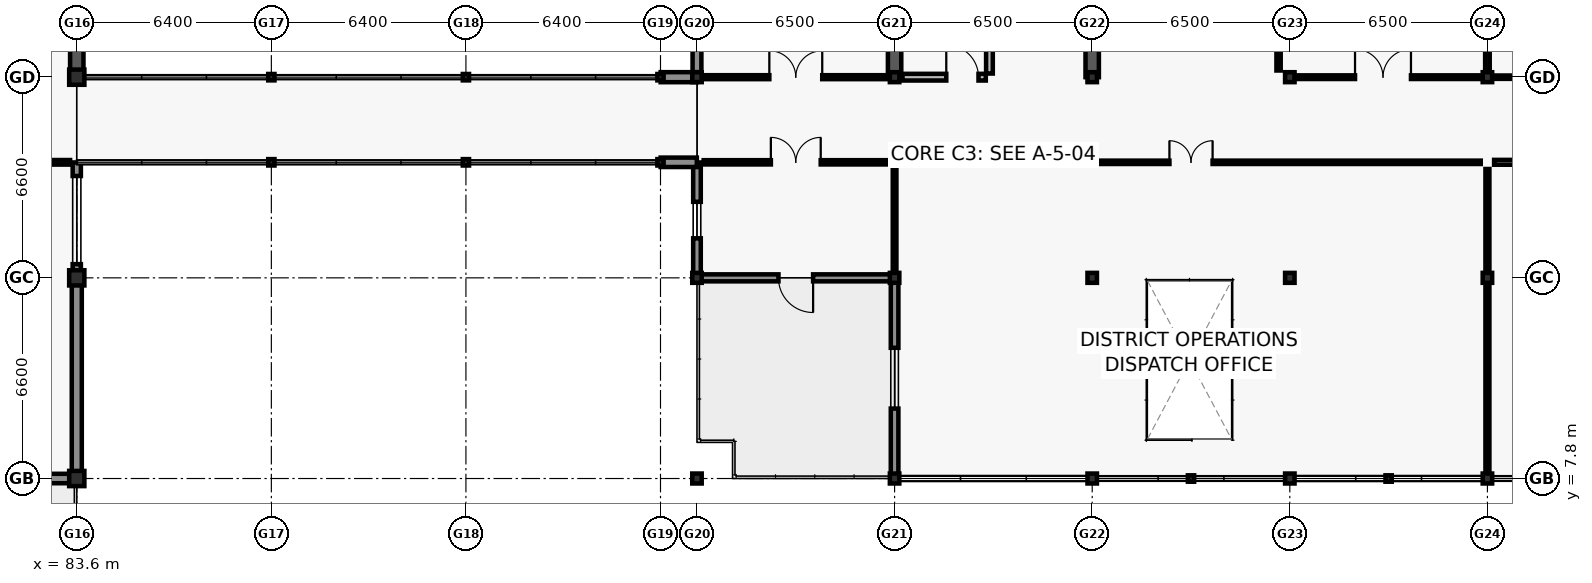
"""IFC4 building model, lengths in metres.
Left out: names, types, materials, properties, quantities, classifications, styles, units other than length and angle.
Written with IfcOpenShell. Run it as: python <this file> out.ifc"""

import sys

from ifc_helpers import new_model, si_unit, direction, frame, frame_2d, origin, origin_2d, place, context, subcontext, project, spatial, rectangle, i_section, extrude, element, fill, save


model = new_model("IFC4")
c1 = context("Model", 3, precision=1e-05, world=origin(), true_north=direction((0.0, 1.0)))
c2 = subcontext(c1, "Body", "Model", "MODEL_VIEW")
j1 = project(units=[si_unit("LENGTHUNIT", "METRE"), si_unit("PLANEANGLEUNIT", "RADIAN")], contexts=[c1])
p1 = place(None, origin())
s1 = spatial("IfcSite", under=j1, at=p1, CompositionType="ELEMENT")
p2 = place(p1, origin())
s2 = spatial("IfcBuilding", under=s1, at=p2, CompositionType="ELEMENT")
p3 = place(p2, frame((0.0, 0.0, 5.4)))
s3 = spatial("IfcBuildingStorey", under=s2, at=p3, CompositionType="ELEMENT", Elevation=5.4)
for number, where, z_axis, x_axis in (
    (1, (83.6, 7.8, 0.0), (0.0, 0.0, 1.0), (1.0, 0.0, 0.0)),
    (2, (83.6, 14.4, 0.0), (0.0, 0.0, 1.0), (1.0, 0.0, 0.0)),
    (3, (83.6, 21.0, 0.0), (0.0, 0.0, 1.0), (1.0, 0.0, 0.0)),
):
    element("IfcColumn", number, at=place(p3, frame(where, z_axis=z_axis, x_axis=x_axis)), inside=s3, PredefinedType="COLUMN", context=c2, shape_type="SweptSolid", body=[
        extrude(i_section(OverallWidth=0.5, OverallDepth=0.5, WebThickness=0.02, FlangeThickness=0.036, at=origin_2d()), origin(), (0.0, 0.0, 1.0), 4.2),
    ])
for number, where, z_axis, x_axis in (
    (4, (90.0, 18.2, 0.0), (0.0, 0.0, 1.0), (1.0, 0.0, 0.0)),
    (5, (90.0, 21.0, 0.0), (0.0, 0.0, 1.0), (1.0, 0.0, 0.0)),
    (6, (96.4, 18.2, 0.0), (0.0, 0.0, 1.0), (1.0, 0.0, 0.0)),
    (7, (96.4, 21.0, 0.0), (0.0, 0.0, 1.0), (1.0, 0.0, 0.0)),
    (8, (102.8, 18.2, 0.0), (0.0, 0.0, 1.0), (1.0, 0.0, 0.0)),
    (9, (102.8, 21.0, 0.0), (0.0, 0.0, 1.0), (1.0, 0.0, 0.0)),
):
    element("IfcColumn", number, at=place(p3, frame(where, z_axis=z_axis, x_axis=x_axis)), inside=s3, PredefinedType="COLUMN", context=c2, shape_type="SweptSolid", body=[
        extrude(i_section(OverallWidth=0.205, OverallDepth=0.21, WebThickness=0.009, FlangeThickness=0.014, FilletRadius=0.011, at=origin_2d()), origin(), (0.0, 0.0, 1.0), 4.2),
    ])
for number, where, z_axis, x_axis in (
    (10, (104.0, 7.8, 0.0), (0.0, 0.0, 1.0), (1.0, 0.0, 0.0)),
    (11, (104.0, 14.4, 0.0), (0.0, 0.0, 1.0), (1.0, 0.0, 0.0)),
    (12, (104.0, 21.0, 0.0), (0.0, 0.0, 1.0), (1.0, 0.0, 0.0)),
    (13, (110.5, 7.8, 0.0), (0.0, 0.0, 1.0), (1.0, 0.0, 0.0)),
    (14, (110.5, 14.4, 0.0), (0.0, 0.0, 1.0), (1.0, 0.0, 0.0)),
    (15, (110.5, 21.0, 0.0), (0.0, 0.0, 1.0), (1.0, 0.0, 0.0)),
    (16, (117.0, 7.8, 0.0), (0.0, 0.0, 1.0), (1.0, 0.0, 0.0)),
    (17, (117.0, 14.4, 0.0), (0.0, 0.0, 1.0), (1.0, 0.0, 0.0)),
    (18, (117.0, 21.0, 0.0), (0.0, 0.0, 1.0), (1.0, 0.0, 0.0)),
    (19, (123.5, 7.8, 0.0), (0.0, 0.0, 1.0), (1.0, 0.0, 0.0)),
    (20, (123.5, 14.4, 0.0), (0.0, 0.0, 1.0), (1.0, 0.0, 0.0)),
    (21, (123.5, 21.0, 0.0), (0.0, 0.0, 1.0), (1.0, 0.0, 0.0)),
    (22, (130.0, 7.8, 0.0), (0.0, 0.0, 1.0), (1.0, 0.0, 0.0)),
    (23, (130.0, 14.4, 0.0), (0.0, 0.0, 1.0), (1.0, 0.0, 0.0)),
    (24, (130.0, 21.0, 0.0), (0.0, 0.0, 1.0), (1.0, 0.0, 0.0)),
):
    element("IfcColumn", number, at=place(p3, frame(where, z_axis=z_axis, x_axis=x_axis)), inside=s3, PredefinedType="COLUMN", context=c2, shape_type="SweptSolid", body=[
        extrude(i_section(OverallWidth=0.311, OverallDepth=0.327, WebThickness=0.016, FlangeThickness=0.025, FilletRadius=0.017, at=origin_2d()), origin(), (0.0, 0.0, 1.0), 4.2),
    ])
for number, where, z_axis, x_axis in (
    (25, (120.25, 7.8, 0.0), (0.0, 0.0, 1.0), (1.0, 0.0, 0.0)),
    (26, (126.75, 7.8, 0.0), (0.0, 0.0, 1.0), (1.0, 0.0, 0.0)),
):
    element("IfcColumn", number, at=place(p3, frame(where, z_axis=z_axis, x_axis=x_axis)), inside=s3, PredefinedType="PILASTER", context=c2, shape_type="SweptSolid", body=[
        extrude(i_section(OverallWidth=0.205, OverallDepth=0.21, WebThickness=0.009, FlangeThickness=0.014, FilletRadius=0.011, at=origin_2d()), origin(), (0.0, 0.0, 1.0), 4.2),
    ])
for number, where, z_axis, x_axis in (
    (27, (83.6, 21.0, 0.0), (0.0, 0.0, 1.0), (0.0, 1.0, 0.0)),
    (28, (110.5, 21.0, 0.0), (0.0, 0.0, 1.0), (0.0, 1.0, 0.0)),
    (29, (117.0, 21.0, 0.0), (0.0, 0.0, 1.0), (0.0, 1.0, 0.0)),
):
    element("IfcWall", number, at=place(p3, frame(where, z_axis=z_axis, x_axis=x_axis)), inside=s3, PredefinedType="SHEAR", context=c2, shape_type="SweptSolid", body=[
        extrude(rectangle(XDim=6.38, YDim=0.44, at=frame_2d((3.19, 0.0))), origin(), (0.0, 0.0, 1.0), 3.96),
    ])
p4 = place(p3, frame((83.595, 7.8, 0.0), z_axis=(0.0, 0.0, 1.0), x_axis=(-1.0, 0.0, 0.0)))
e30 = element("IfcWall", 30, at=p4, inside=s3, PredefinedType="SOLIDWALL", context=c2, shape_type="SweptSolid", body=[
    extrude(rectangle(XDim=6.39, YDim=0.31, at=frame_2d((3.195, 0.0))), origin(), (0.0, 0.0, 1.0), 3.32),
])
p5 = place(p4, frame((2.385, 0.0, 0.0)))
e31 = element("IfcOpeningElement", 31, at=p5, cuts=e30, PredefinedType="OPENING", context=c2, shape_type="SweptSolid", body=[
    extrude(rectangle(XDim=1.62, YDim=2.18, at=frame_2d((0.81, 1.09))), frame((0.0, 0.165, 0.0), z_axis=(0.0, -1.0, 0.0), x_axis=(1.0, 0.0, 0.0)), (0.0, 0.0, 1.0), 0.33),
])
p6 = place(p3, frame((83.6, 14.395, 0.0), z_axis=(0.0, 0.0, 1.0), x_axis=(0.0, -1.0, 0.0)))
e32 = element("IfcWall", 32, at=p6, inside=s3, PredefinedType="SOLIDWALL", context=c2, shape_type="SweptSolid", body=[
    extrude(rectangle(XDim=6.59, YDim=0.33, at=frame_2d((3.295, 0.0))), origin(), (0.0, 0.0, 1.0), 3.32),
])
p7 = place(p3, frame((83.6, 18.195, 0.0), z_axis=(0.0, 0.0, 1.0), x_axis=(0.0, -1.0, 0.0)))
e33 = element("IfcWall", 33, at=p7, inside=s3, PredefinedType="SOLIDWALL", context=c2, shape_type="SweptSolid", body=[
    extrude(rectangle(XDim=3.79, YDim=0.27, at=frame_2d((1.895, 0.0))), origin(), (0.0, 0.0, 1.0), 3.32),
])
p8 = place(p7, frame((0.445, 0.0, 0.72)))
e34 = element("IfcOpeningElement", 34, at=p8, cuts=e33, PredefinedType="OPENING", context=c2, shape_type="SweptSolid", body=[
    extrude(rectangle(XDim=2.9, YDim=1.15, at=frame_2d((1.45, 0.575))), frame((0.0, 0.145, 0.0), z_axis=(0.0, -1.0, 0.0), x_axis=(1.0, 0.0, 0.0)), (0.0, 0.0, 1.0), 0.29),
])
p9 = place(p3, frame((110.495, 14.4, 0.0), z_axis=(0.0, 0.0, 1.0), x_axis=(-1.0, 0.0, 0.0)))
e35 = element("IfcWall", 35, at=p9, inside=s3, PredefinedType="SOLIDWALL", context=c2, shape_type="SweptSolid", body=[
    extrude(rectangle(XDim=6.49, YDim=0.23, at=frame_2d((3.245, 0.0))), origin(), (0.0, 0.0, 1.0), 3.32),
])
p10 = place(p9, frame((2.675, 0.0, 0.0)))
e36 = element("IfcOpeningElement", 36, at=p10, cuts=e35, PredefinedType="OPENING", context=c2, shape_type="SweptSolid", body=[
    extrude(rectangle(XDim=1.14, YDim=2.14, at=frame_2d((0.57, 1.07))), frame((0.0, 0.125, 0.0), z_axis=(0.0, -1.0, 0.0), x_axis=(1.0, 0.0, 0.0)), (0.0, 0.0, 1.0), 0.25),
])
p11 = place(p3, frame((110.5, 7.805, 0.0), z_axis=(0.0, 0.0, 1.0), x_axis=(0.0, 1.0, 0.0)))
e37 = element("IfcWall", 37, at=p11, inside=s3, PredefinedType="SOLIDWALL", context=c2, shape_type="SweptSolid", body=[
    extrude(rectangle(XDim=6.59, YDim=0.25, at=frame_2d((3.295, 0.0))), origin(), (0.0, 0.0, 1.0), 3.32),
])
p12 = place(p11, frame((2.295, 0.0, 0.8)))
e38 = element("IfcOpeningElement", 38, at=p12, cuts=e37, PredefinedType="OPENING", context=c2, shape_type="SweptSolid", body=[
    extrude(rectangle(XDim=2.0, YDim=1.55, at=frame_2d((1.0, 0.775))), frame((0.0, 0.135, 0.0), z_axis=(0.0, -1.0, 0.0), x_axis=(1.0, 0.0, 0.0)), (0.0, 0.0, 1.0), 0.27),
])
p13 = place(p3, frame((104.0, 14.405, 0.0), z_axis=(0.0, 0.0, 1.0), x_axis=(0.0, 1.0, 0.0)))
e39 = element("IfcWall", 39, at=p13, inside=s3, PredefinedType="SOLIDWALL", context=c2, shape_type="SweptSolid", body=[
    extrude(rectangle(XDim=3.79, YDim=0.25, at=frame_2d((1.895, 0.0))), origin(), (0.0, 0.0, 1.0), 3.32),
])
p14 = place(p13, frame((1.295, 0.0, 0.8)))
e40 = element("IfcOpeningElement", 40, at=p14, cuts=e39, PredefinedType="OPENING", context=c2, shape_type="SweptSolid", body=[
    extrude(rectangle(XDim=1.2, YDim=2.05, at=frame_2d((0.6, 1.025))), frame((0.0, 0.135, 0.0), z_axis=(0.0, -1.0, 0.0), x_axis=(1.0, 0.0, 0.0)), (0.0, 0.0, 1.0), 0.27),
])
p15 = place(p3, frame((104.0, 21.005, 0.0), z_axis=(0.0, 0.0, 1.0), x_axis=(0.0, 1.0, 0.0)))
e41 = element("IfcWall", 41, at=p15, inside=s3, PredefinedType="SOLIDWALL", context=c2, shape_type="SweptSolid", body=[
    extrude(rectangle(XDim=6.59, YDim=0.29, at=frame_2d((3.295, 0.0))), origin(), (0.0, 0.0, 1.0), 3.32),
])
p16 = place(p15, frame((2.545, 0.0, 0.8)))
e42 = element("IfcOpeningElement", 42, at=p16, cuts=e41, PredefinedType="OPENING", context=c2, shape_type="SweptSolid", body=[
    extrude(rectangle(XDim=1.5, YDim=2.05, at=frame_2d((0.75, 1.025))), frame((0.0, 0.155, 0.0), z_axis=(0.0, -1.0, 0.0), x_axis=(1.0, 0.0, 0.0)), (0.0, 0.0, 1.0), 0.31),
])
p17 = place(p3, frame((103.995, 18.2, 0.0), z_axis=(0.0, 0.0, 1.0), x_axis=(-1.0, 0.0, 0.0)))
e43 = element("IfcWall", 43, at=p17, inside=s3, PredefinedType="SOLIDWALL", context=c2, shape_type="SweptSolid", body=[
    extrude(rectangle(XDim=1.19, YDim=0.31, at=frame_2d((0.595, 0.0))), origin(), (0.0, 0.0, 1.0), 3.32),
])
p18 = place(p3, frame((102.805, 21.0, 0.0), z_axis=(0.0, 0.0, 1.0), x_axis=(1.0, 0.0, 0.0)))
e44 = element("IfcWall", 44, at=p18, inside=s3, PredefinedType="SOLIDWALL", context=c2, shape_type="SweptSolid", body=[
    extrude(rectangle(XDim=1.19, YDim=0.33, at=frame_2d((0.595, 0.0))), origin(), (0.0, 0.0, 1.0), 3.32),
])
p19 = place(p3, frame((113.62, 21.12, 0.0), z_axis=(0.0, 0.0, 1.0), x_axis=(0.0, 1.0, 0.0)))
e45 = element("IfcWall", 45, at=p19, inside=s3, PredefinedType="SOLIDWALL", context=c2, shape_type="SweptSolid", body=[
    extrude(rectangle(XDim=6.255, YDim=0.22, at=frame_2d((3.127, 0.0))), origin(), (0.0, 0.0, 1.0), 3.96),
])
p20 = place(p3, frame((110.76, 21.0, 0.0), z_axis=(0.0, 0.0, 1.0), x_axis=(1.0, 0.0, 0.0)))
e46 = element("IfcWall", 46, at=p20, inside=s3, PredefinedType="SOLIDWALL", context=c2, shape_type="SweptSolid", body=[
    extrude(rectangle(XDim=2.74, YDim=0.22, at=frame_2d((1.37, 0.0))), origin(), (0.0, 0.0, 1.0), 3.32),
])
p21 = place(p20, frame((1.44, 0.0, 0.0)))
e47 = element("IfcOpeningElement", 47, at=p21, cuts=e46, PredefinedType="OPENING", context=c2, shape_type="SweptSolid", body=[
    extrude(rectangle(XDim=1.06, YDim=2.1, at=frame_2d((0.53, 1.05))), frame((0.0, 0.12, 0.0), z_axis=(0.0, -1.0, 0.0), x_axis=(1.0, 0.0, 0.0)), (0.0, 0.0, 1.0), 0.24),
])
p22 = place(p3, frame((123.13, 21.22, 0.0), z_axis=(0.0, 0.0, 1.0), x_axis=(0.0, 1.0, 0.0)))
e48 = element("IfcWall", 48, at=p22, inside=s3, PredefinedType="PARTITIONING", context=c2, shape_type="SweptSolid", body=[
    extrude(rectangle(XDim=2.76, YDim=0.14, at=frame_2d((1.38, 0.0))), origin(), (0.0, 0.0, 1.0), 3.3),
])
p23 = place(p22, frame((0.88, 0.0, 0.0)))
e49 = element("IfcOpeningElement", 49, at=p23, cuts=e48, PredefinedType="OPENING", context=c2, shape_type="SweptSolid", body=[
    extrude(rectangle(XDim=1.0, YDim=2.12, at=frame_2d((0.5, 1.06))), frame((0.0, 0.08, 0.0), z_axis=(0.0, -1.0, 0.0), x_axis=(1.0, 0.0, 0.0)), (0.0, 0.0, 1.0), 0.16),
])
p24 = place(p3, frame((77.42, 18.2, 0.0), z_axis=(0.0, 0.0, 1.0), x_axis=(1.0, 0.0, 0.0)))
e50 = element("IfcWall", 50, at=p24, inside=s3, PredefinedType="PARTITIONING", context=c2, shape_type="SweptSolid", body=[
    extrude(rectangle(XDim=5.96, YDim=0.15, at=frame_2d((2.98, 0.0))), origin(), (0.0, 0.0, 1.0), 3.3),
])
p25 = place(p24, frame((2.325, 0.0, 0.0)))
e51 = element("IfcOpeningElement", 51, at=p25, cuts=e50, PredefinedType="OPENING", context=c2, shape_type="SweptSolid", body=[
    extrude(rectangle(XDim=1.31, YDim=2.14, at=frame_2d((0.655, 1.07))), frame((0.0, 0.085, 0.0), z_axis=(0.0, -1.0, 0.0), x_axis=(1.0, 0.0, 0.0)), (0.0, 0.0, 1.0), 0.17),
])
p26 = place(p3, frame((130.0, 8.02, 0.0), z_axis=(0.0, 0.0, 1.0), x_axis=(0.0, 1.0, 0.0)))
e52 = element("IfcWall", 52, at=p26, inside=s3, PredefinedType="PARTITIONING", context=c2, shape_type="SweptSolid", body=[
    extrude(rectangle(XDim=9.96, YDim=0.13, at=frame_2d((4.98, 0.0))), origin(), (0.0, 0.0, 1.0), 3.3),
])
p27 = place(p3, frame((110.5, 14.62, 0.0), z_axis=(0.0, 0.0, 1.0), x_axis=(0.0, 1.0, 0.0)))
e53 = element("IfcWall", 53, at=p27, inside=s3, PredefinedType="PARTITIONING", context=c2, shape_type="SweptSolid", body=[
    extrude(rectangle(XDim=3.36, YDim=0.12, at=frame_2d((1.68, 0.0))), origin(), (0.0, 0.0, 1.0), 3.3),
])
p28 = place(p3, frame((110.72, 18.2, 0.0), z_axis=(0.0, 0.0, 1.0), x_axis=(1.0, 0.0, 0.0)))
e54 = element("IfcWall", 54, at=p28, inside=s3, PredefinedType="PARTITIONING", context=c2, shape_type="SweptSolid", body=[
    extrude(rectangle(XDim=19.06, YDim=0.11, at=frame_2d((9.53, 0.0))), origin(), (0.0, 0.0, 1.0), 3.3),
])
p29 = place(p28, frame((8.82, 0.0, 0.0)))
e55 = element("IfcOpeningElement", 55, at=p29, cuts=e54, PredefinedType="OPENING", context=c2, shape_type="SweptSolid", body=[
    extrude(rectangle(XDim=1.42, YDim=2.15, at=frame_2d((0.71, 1.075))), frame((0.0, 0.065, 0.0), z_axis=(0.0, -1.0, 0.0), x_axis=(1.0, 0.0, 0.0)), (0.0, 0.0, 1.0), 0.13),
])
p30 = place(p3, frame((130.22, 18.2, 0.0), z_axis=(0.0, 0.0, 1.0), x_axis=(1.0, 0.0, 0.0)))
e56 = element("IfcWall", 56, at=p30, inside=s3, PredefinedType="PARTITIONING", context=c2, shape_type="SweptSolid", body=[
    extrude(rectangle(XDim=19.06, YDim=0.16, at=frame_2d((9.53, 0.0))), origin(), (0.0, 0.0, 1.0), 3.3),
])
p31 = place(p30, frame((8.79, 0.0, 0.0)))
e57 = element("IfcOpeningElement", 57, at=p31, cuts=e56, PredefinedType="OPENING", context=c2, shape_type="SweptSolid", body=[
    extrude(rectangle(XDim=1.48, YDim=2.18, at=frame_2d((0.74, 1.09))), frame((0.0, 0.09, 0.0), z_axis=(0.0, -1.0, 0.0), x_axis=(1.0, 0.0, 0.0)), (0.0, 0.0, 1.0), 0.18),
])
p32 = place(p3, frame((104.22, 18.2, 0.0), z_axis=(0.0, 0.0, 1.0), x_axis=(1.0, 0.0, 0.0)))
e58 = element("IfcWall", 58, at=p32, inside=s3, PredefinedType="PARTITIONING", context=c2, shape_type="SweptSolid", body=[
    extrude(rectangle(XDim=6.06, YDim=0.14, at=frame_2d((3.03, 0.0))), origin(), (0.0, 0.0, 1.0), 3.3),
])
p33 = place(p32, frame((2.21, 0.0, 0.0)))
e59 = element("IfcOpeningElement", 59, at=p33, cuts=e58, PredefinedType="OPENING", context=c2, shape_type="SweptSolid", body=[
    extrude(rectangle(XDim=1.64, YDim=2.2, at=frame_2d((0.82, 1.1))), frame((0.0, 0.08, 0.0), z_axis=(0.0, -1.0, 0.0), x_axis=(1.0, 0.0, 0.0)), (0.0, 0.0, 1.0), 0.16),
])
p34 = place(p3, frame((104.22, 21.0, 0.0), z_axis=(0.0, 0.0, 1.0), x_axis=(1.0, 0.0, 0.0)))
e60 = element("IfcWall", 60, at=p34, inside=s3, PredefinedType="PARTITIONING", context=c2, shape_type="SweptSolid", body=[
    extrude(rectangle(XDim=6.06, YDim=0.13, at=frame_2d((3.03, 0.0))), origin(), (0.0, 0.0, 1.0), 3.3),
])
p35 = place(p34, frame((2.16, 0.0, 0.0)))
e61 = element("IfcOpeningElement", 61, at=p35, cuts=e60, PredefinedType="OPENING", context=c2, shape_type="SweptSolid", body=[
    extrude(rectangle(XDim=1.74, YDim=2.2, at=frame_2d((0.87, 1.1))), frame((0.0, 0.075, 0.0), z_axis=(0.0, -1.0, 0.0), x_axis=(1.0, 0.0, 0.0)), (0.0, 0.0, 1.0), 0.15),
])
p36 = place(p3, frame((123.35, 21.0, 0.0), z_axis=(0.0, 0.0, 1.0), x_axis=(1.0, 0.0, 0.0)))
e62 = element("IfcWall", 62, at=p36, inside=s3, PredefinedType="PARTITIONING", context=c2, shape_type="SweptSolid", body=[
    extrude(rectangle(XDim=6.43, YDim=0.12, at=frame_2d((3.215, 0.0))), origin(), (0.0, 0.0, 1.0), 3.3),
])
p37 = place(p36, frame((2.295, 0.0, 0.0)))
e63 = element("IfcOpeningElement", 63, at=p37, cuts=e62, PredefinedType="OPENING", context=c2, shape_type="SweptSolid", body=[
    extrude(rectangle(XDim=1.84, YDim=2.22, at=frame_2d((0.92, 1.11))), frame((0.0, 0.07, 0.0), z_axis=(0.0, -1.0, 0.0), x_axis=(1.0, 0.0, 0.0)), (0.0, 0.0, 1.0), 0.14),
])
p38 = place(p3, frame((130.22, 21.0, 0.0), z_axis=(0.0, 0.0, 1.0), x_axis=(1.0, 0.0, 0.0)))
e64 = element("IfcWall", 64, at=p38, inside=s3, PredefinedType="PARTITIONING", context=c2, shape_type="SweptSolid", body=[
    extrude(rectangle(XDim=6.06, YDim=0.11, at=frame_2d((3.03, 0.0))), origin(), (0.0, 0.0, 1.0), 3.3),
])
p39 = place(p38, frame((2.59, 0.0, 0.0)))
e65 = element("IfcOpeningElement", 65, at=p39, cuts=e64, PredefinedType="OPENING", context=c2, shape_type="SweptSolid", body=[
    extrude(rectangle(XDim=0.88, YDim=2.04, at=frame_2d((0.44, 1.02))), frame((0.0, 0.065, 0.0), z_axis=(0.0, -1.0, 0.0), x_axis=(1.0, 0.0, 0.0)), (0.0, 0.0, 1.0), 0.13),
])
p40 = place(p3, frame((130.0, 21.22, 0.0), z_axis=(0.0, 0.0, 1.0), x_axis=(0.0, 1.0, 0.0)))
e66 = element("IfcWall", 66, at=p40, inside=s3, PredefinedType="PARTITIONING", context=c2, shape_type="SweptSolid", body=[
    extrude(rectangle(XDim=6.16, YDim=0.15, at=frame_2d((3.08, 0.0))), origin(), (0.0, 0.0, 1.0), 3.3),
])
p41 = place(p8, origin())
e67 = element("IfcWindow", 67, at=p41, inside=s3, PartitioningType="TRIPLE_PANEL_VERTICAL", PredefinedType="WINDOW", context=c2, shape_type="SweptSolid", body=[
    extrude(rectangle(XDim=2.9, YDim=1.15, at=frame_2d((1.45, 0.575))), frame((0.0, 0.03, 0.0), z_axis=(0.0, -1.0, 0.0), x_axis=(1.0, 0.0, 0.0)), (0.0, 0.0, 1.0), 0.06),
])
fill(e34, e67)
p42 = place(p10, origin())
e68 = element("IfcDoor", 68, at=p42, inside=s3, OperationType="SINGLE_SWING_LEFT", PredefinedType="DOOR", context=c2, shape_type="SweptSolid", body=[
    extrude(rectangle(XDim=1.14, YDim=2.14, at=frame_2d((0.57, 1.07))), frame((0.0, 0.025, 0.0), z_axis=(0.0, -1.0, 0.0), x_axis=(1.0, 0.0, 0.0)), (0.0, 0.0, 1.0), 0.05),
])
fill(e36, e68)
p43 = place(p12, origin())
e69 = element("IfcWindow", 69, at=p43, inside=s3, PartitioningType="DOUBLE_PANEL_VERTICAL", PredefinedType="WINDOW", context=c2, shape_type="SweptSolid", body=[
    extrude(rectangle(XDim=2.0, YDim=1.55, at=frame_2d((1.0, 0.775))), frame((0.0, 0.03, 0.0), z_axis=(0.0, -1.0, 0.0), x_axis=(1.0, 0.0, 0.0)), (0.0, 0.0, 1.0), 0.06),
])
fill(e38, e69)
p44 = place(p14, origin())
e70 = element("IfcWindow", 70, at=p44, inside=s3, PartitioningType="SINGLE_PANEL", PredefinedType="WINDOW", context=c2, shape_type="SweptSolid", body=[
    extrude(rectangle(XDim=1.2, YDim=2.05, at=frame_2d((0.6, 1.025))), frame((0.0, 0.03, 0.0), z_axis=(0.0, -1.0, 0.0), x_axis=(1.0, 0.0, 0.0)), (0.0, 0.0, 1.0), 0.06),
])
fill(e40, e70)
p45 = place(p21, origin())
e71 = element("IfcDoor", 71, at=p45, inside=s3, OperationType="SINGLE_SWING_LEFT", PredefinedType="DOOR", context=c2, shape_type="SweptSolid", body=[
    extrude(rectangle(XDim=1.06, YDim=2.1, at=frame_2d((0.53, 1.05))), frame((0.0, 0.025, 0.0), z_axis=(0.0, -1.0, 0.0), x_axis=(1.0, 0.0, 0.0)), (0.0, 0.0, 1.0), 0.05),
])
fill(e47, e71)
p46 = place(p29, origin())
e72 = element("IfcDoor", 72, at=p46, inside=s3, OperationType="DOUBLE_DOOR_SINGLE_SWING", PredefinedType="DOOR", context=c2, shape_type="SweptSolid", body=[
    extrude(rectangle(XDim=1.42, YDim=2.15, at=frame_2d((0.71, 1.075))), frame((0.0, 0.025, 0.0), z_axis=(0.0, -1.0, 0.0), x_axis=(1.0, 0.0, 0.0)), (0.0, 0.0, 1.0), 0.05),
])
fill(e55, e72)
p47 = place(p33, origin())
e73 = element("IfcDoor", 73, at=p47, inside=s3, OperationType="DOUBLE_DOOR_SINGLE_SWING", PredefinedType="DOOR", context=c2, shape_type="SweptSolid", body=[
    extrude(rectangle(XDim=1.64, YDim=2.2, at=frame_2d((0.82, 1.1))), frame((0.0, 0.025, 0.0), z_axis=(0.0, -1.0, 0.0), x_axis=(1.0, 0.0, 0.0)), (0.0, 0.0, 1.0), 0.05),
])
fill(e59, e73)
p48 = place(p35, origin())
e74 = element("IfcDoor", 74, at=p48, inside=s3, OperationType="DOUBLE_DOOR_SINGLE_SWING", PredefinedType="DOOR", context=c2, shape_type="SweptSolid", body=[
    extrude(rectangle(XDim=1.74, YDim=2.2, at=frame_2d((0.87, 1.1))), frame((0.0, 0.025, 0.0), z_axis=(0.0, -1.0, 0.0), x_axis=(1.0, 0.0, 0.0)), (0.0, 0.0, 1.0), 0.05),
])
fill(e61, e74)
p49 = place(p37, origin())
e75 = element("IfcDoor", 75, at=p49, inside=s3, OperationType="DOUBLE_DOOR_SINGLE_SWING", PredefinedType="DOOR", context=c2, shape_type="SweptSolid", body=[
    extrude(rectangle(XDim=1.84, YDim=2.22, at=frame_2d((0.92, 1.11))), frame((0.0, 0.025, 0.0), z_axis=(0.0, -1.0, 0.0), x_axis=(1.0, 0.0, 0.0)), (0.0, 0.0, 1.0), 0.05),
])
fill(e63, e75)
save(model, sys.argv[1])
